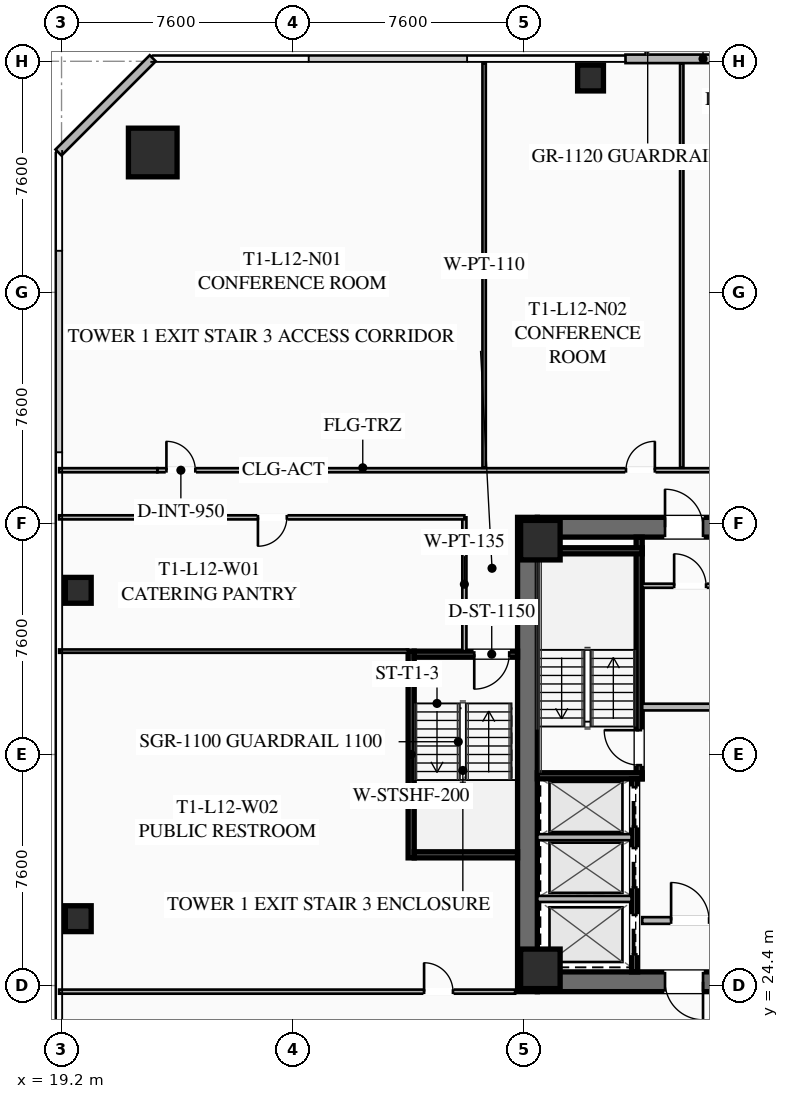
"""IFC4 building model, lengths in metres.
Left out: names, types, materials, properties, quantities, classifications, styles, units other than length and angle.
Written with IfcOpenShell. Run it as: python <this file> out.ifc"""

import sys

from ifc_helpers import new_model, si_unit, direction, frame, frame_2d, origin, origin_2d, place, context, subcontext, project, spatial, rectangle, hollow_rectangle, extrude, element, fill, save


model = new_model("IFC4")
c1 = context("Model", 3, precision=1e-05, world=origin(), true_north=direction((0.0, 1.0)))
c2 = subcontext(c1, "Body", "Model", "MODEL_VIEW")
j1 = project(units=[si_unit("LENGTHUNIT", "METRE"), si_unit("PLANEANGLEUNIT", "RADIAN")], contexts=[c1])
p1 = place(None, origin())
s1 = spatial("IfcSite", under=j1, at=p1, CompositionType="ELEMENT")
p2 = place(p1, origin())
s2 = spatial("IfcBuilding", under=s1, at=p2, CompositionType="ELEMENT")
p3 = place(p2, frame((0.0, 0.0, 49.45)))
s3 = spatial("IfcBuildingStorey", under=s2, at=p3, CompositionType="ELEMENT", Elevation=49.45)
p4 = place(p3, frame((34.525, 24.2, 0.0), z_axis=(0.0, 0.0, 1.0), x_axis=(0.0, 1.0, 0.0)))
e1 = element("IfcWall", 1, at=p4, inside=s3, PredefinedType="SHEAR", context=c2, shape_type="SweptSolid", body=[
    extrude(rectangle(XDim=15.6, YDim=0.65, at=frame_2d((7.8, 0.0))), origin(), (0.0, 0.0, 1.0), 3.55),
])
p5 = place(p3, frame((49.15, 24.525, 0.0), z_axis=(0.0, 0.0, 1.0), x_axis=(-1.0, 0.0, 0.0)))
e2 = element("IfcWall", 2, at=p5, inside=s3, PredefinedType="SHEAR", context=c2, shape_type="SweptSolid", body=[
    extrude(rectangle(XDim=14.3, YDim=0.65, at=frame_2d((7.15, 0.0))), origin(), (0.0, 0.0, 1.0), 3.55),
])
p6 = place(p5, frame((8.85, 0.0, 0.0)))
e3 = element("IfcOpeningElement", 3, at=p6, cuts=e2, PredefinedType="OPENING", context=c2, shape_type="SweptSolid", body=[
    extrude(rectangle(XDim=1.25, YDim=2.25, at=frame_2d((0.625, 1.125))), frame((0.0, 0.335, 0.0), z_axis=(0.0, -1.0, 0.0), x_axis=(1.0, 0.0, 0.0)), (0.0, 0.0, 1.0), 0.67),
])
p7 = place(p5, frame((3.8, 0.0, 0.0)))
e4 = element("IfcOpeningElement", 4, at=p7, cuts=e2, PredefinedType="OPENING", context=c2, shape_type="SweptSolid", body=[
    extrude(rectangle(XDim=1.25, YDim=2.25, at=frame_2d((0.625, 1.125))), frame((0.0, 0.335, 0.0), z_axis=(0.0, -1.0, 0.0), x_axis=(1.0, 0.0, 0.0)), (0.0, 0.0, 1.0), 0.67),
])
p8 = place(p3, frame((34.85, 39.475, 0.0), z_axis=(0.0, 0.0, 1.0), x_axis=(1.0, 0.0, 0.0)))
e5 = element("IfcWall", 5, at=p8, inside=s3, PredefinedType="SHEAR", context=c2, shape_type="SweptSolid", body=[
    extrude(rectangle(XDim=14.3, YDim=0.65, at=frame_2d((7.15, 0.0))), origin(), (0.0, 0.0, 1.0), 3.55),
])
p9 = place(p8, frame((4.2, 0.0, 0.0)))
e6 = element("IfcOpeningElement", 6, at=p9, cuts=e5, PredefinedType="OPENING", context=c2, shape_type="SweptSolid", body=[
    extrude(rectangle(XDim=1.25, YDim=2.25, at=frame_2d((0.625, 1.125))), frame((0.0, 0.335, 0.0), z_axis=(0.0, -1.0, 0.0), x_axis=(1.0, 0.0, 0.0)), (0.0, 0.0, 1.0), 0.67),
])
p10 = place(p8, frame((9.25, 0.0, 0.0)))
e7 = element("IfcOpeningElement", 7, at=p10, cuts=e5, PredefinedType="OPENING", context=c2, shape_type="SweptSolid", body=[
    extrude(rectangle(XDim=1.25, YDim=2.25, at=frame_2d((0.625, 1.125))), frame((0.0, 0.335, 0.0), z_axis=(0.0, -1.0, 0.0), x_axis=(1.0, 0.0, 0.0)), (0.0, 0.0, 1.0), 0.67),
])
for number, where, z_axis, x_axis in (
    (8, (34.95, 24.95, 0.0), (0.0, 0.0, 1.0), (1.0, 0.0, 0.0)),
    (9, (34.95, 39.05, 0.0), (0.0, 0.0, 1.0), (1.0, 0.0, 0.0)),
):
    element("IfcColumn", number, at=place(p3, frame(where, z_axis=z_axis, x_axis=x_axis)), inside=s3, PredefinedType="COLUMN", context=c2, shape_type="SweptSolid", body=[
        extrude(hollow_rectangle(XDim=1.3, YDim=1.3, WallThickness=0.05, at=origin_2d()), origin(), (0.0, 0.0, 1.0), 3.35),
    ])
p11 = place(p3, frame((22.2, 51.8, 0.0), z_axis=(0.0, 0.0, 1.0), x_axis=(1.0, 0.0, 0.0)))
e10 = element("IfcColumn", 10, at=p11, inside=s3, PredefinedType="COLUMN", context=c2, shape_type="SweptSolid", body=[
    extrude(hollow_rectangle(XDim=1.6, YDim=1.6, WallThickness=0.06, at=origin_2d()), origin(), (0.0, 0.0, 1.0), 3.35),
])
for number, where, z_axis, x_axis in (
    (11, (36.6, 54.25, 0.0), (0.0, 0.0, 1.0), (1.0, 0.0, 0.0)),
    (12, (19.75, 37.4, 0.0), (0.0, 0.0, 1.0), (1.0, 0.0, 0.0)),
    (13, (19.75, 26.6, 0.0), (0.0, 0.0, 1.0), (1.0, 0.0, 0.0)),
):
    element("IfcColumn", number, at=place(p3, frame(where, z_axis=z_axis, x_axis=x_axis)), inside=s3, PredefinedType="COLUMN", context=c2, shape_type="SweptSolid", body=[
        extrude(hollow_rectangle(XDim=0.85, YDim=0.85, WallThickness=0.035, at=origin_2d()), origin(), (0.0, 0.0, 1.0), 3.35),
    ])
p12 = place(p3, frame((37.75, 54.88, 0.0), z_axis=(0.0, 0.0, 1.0), x_axis=(1.0, 0.0, 0.0)))
e14 = element("IfcWall", 14, at=p12, inside=s3, PredefinedType="SOLIDWALL", context=c2, shape_type="SweptSolid", body=[
    extrude(rectangle(XDim=8.5, YDim=0.28, at=frame_2d((4.25, 0.0))), origin(), (0.0, 0.0, 1.0), 3.35),
])
p13 = place(p12, frame((3.6, 0.0, 0.0)))
e15 = element("IfcOpeningElement", 15, at=p13, cuts=e14, PredefinedType="OPENING", context=c2, shape_type="SweptSolid", body=[
    extrude(rectangle(XDim=1.3, YDim=2.15, at=frame_2d((0.65, 1.075))), frame((0.0, 0.15, 0.0), z_axis=(0.0, -1.0, 0.0), x_axis=(1.0, 0.0, 0.0)), (0.0, 0.0, 1.0), 0.3),
])
p14 = place(p12, frame((5.24, 0.0, 0.85)))
e16 = element("IfcOpeningElement", 16, at=p14, cuts=e14, PredefinedType="OPENING", context=c2, shape_type="SweptSolid", body=[
    extrude(rectangle(XDim=1.8, YDim=1.92, at=frame_2d((0.9, 0.96))), frame((0.0, 0.15, 0.0), z_axis=(0.0, -1.0, 0.0), x_axis=(1.0, 0.0, 0.0)), (0.0, 0.0, 1.0), 0.3),
])
p15 = place(p3, frame((19.1, 51.8, 0.0), z_axis=(0.0, 0.0, 1.0), x_axis=(0.707106781187, 0.707106781187, 0.0)))
e17 = element("IfcWall", 17, at=p15, inside=s3, PredefinedType="SOLIDWALL", context=c2, shape_type="SweptSolid", body=[
    extrude(rectangle(XDim=4.384, YDim=0.28, at=frame_2d((2.192, 0.0))), origin(), (0.0, 0.0, 1.0), 3.35),
])
p16 = place(p3, frame((38.2, 31.2, 0.0), z_axis=(0.0, 0.0, 1.0), x_axis=(0.0, 1.0, 0.0)))
e18 = element("IfcWall", 18, at=p16, inside=s3, PredefinedType="SHEAR", context=c2, shape_type="SweptSolid", body=[
    extrude(rectangle(XDim=7.95, YDim=0.2, at=frame_2d((3.975, 0.0))), origin(), (0.0, 0.0, 1.0), 3.35),
])
p17 = place(p16, frame((0.45, 0.0, 0.0)))
e19 = element("IfcOpeningElement", 19, at=p17, cuts=e18, PredefinedType="OPENING", context=c2, shape_type="SweptSolid", body=[
    extrude(rectangle(XDim=1.15, YDim=2.2, at=frame_2d((0.575, 1.1))), frame((0.0, 0.11, 0.0), z_axis=(0.0, -1.0, 0.0), x_axis=(1.0, 0.0, 0.0)), (0.0, 0.0, 1.0), 0.22),
])
for number, where, z_axis, x_axis in (
    (20, (34.85, 31.3, 0.0), (0.0, 0.0, 1.0), (1.0, 0.0, 0.0)),
    (21, (34.85, 38.7, 0.0), (0.0, 0.0, 1.0), (1.0, 0.0, 0.0)),
):
    element("IfcWall", number, at=place(p3, frame(where, z_axis=z_axis, x_axis=x_axis)), inside=s3, PredefinedType="SHEAR", context=c2, shape_type="SweptSolid", body=[
        extrude(rectangle(XDim=3.45, YDim=0.2, at=frame_2d((1.725, 0.0))), origin(), (0.0, 0.0, 1.0), 3.35),
    ])
p18 = place(p3, frame((38.3, 33.56, 0.0), z_axis=(0.0, 0.0, 1.0), x_axis=(1.0, 0.0, 0.0)))
e22 = element("IfcWall", 22, at=p18, inside=s3, PredefinedType="SOLIDWALL", context=c2, shape_type="SweptSolid", body=[
    extrude(rectangle(XDim=3.15, YDim=0.22, at=frame_2d((1.575, 0.0))), origin(), (0.0, 0.0, 1.0), 2.703),
])
p19 = place(p3, frame((38.3, 26.54, 0.0), z_axis=(0.0, 0.0, 1.0), x_axis=(1.0, 0.0, 0.0)))
e23 = element("IfcWall", 23, at=p19, inside=s3, PredefinedType="SOLIDWALL", context=c2, shape_type="SweptSolid", body=[
    extrude(rectangle(XDim=3.15, YDim=0.22, at=frame_2d((1.575, 0.0))), origin(), (0.0, 0.0, 1.0), 2.703),
])
p20 = place(p19, frame((0.95, 0.0, 0.0)))
e24 = element("IfcOpeningElement", 24, at=p20, cuts=e23, PredefinedType="OPENING", context=c2, shape_type="SweptSolid", body=[
    extrude(rectangle(XDim=1.25, YDim=2.25, at=frame_2d((0.625, 1.125))), frame((0.0, 0.12, 0.0), z_axis=(0.0, -1.0, 0.0), x_axis=(1.0, 0.0, 0.0)), (0.0, 0.0, 1.0), 0.24),
])
p21 = place(p3, frame((38.05, 24.85, 0.0), z_axis=(0.0, 0.0, 1.0), x_axis=(0.0, 1.0, 0.0)))
e25 = element("IfcWall", 25, at=p21, inside=s3, PredefinedType="SHEAR", context=c2, shape_type="SweptSolid", body=[
    extrude(rectangle(XDim=6.35, YDim=0.2, at=frame_2d((3.175, 0.0))), origin(), (0.0, 0.0, 1.0), 3.35),
])
p22 = place(p21, frame((4.775, 0.0, 0.0)))
e26 = element("IfcOpeningElement", 26, at=p22, cuts=e25, PredefinedType="OPENING", context=c2, shape_type="SweptSolid", body=[
    extrude(rectangle(XDim=1.3, YDim=2.25, at=frame_2d((0.65, 1.125))), frame((0.0, 0.11, 0.0), z_axis=(0.0, -1.0, 0.0), x_axis=(1.0, 0.0, 0.0)), (0.0, 0.0, 1.0), 0.22),
])
p23 = place(p21, frame((2.775, 0.0, 0.0)))
e27 = element("IfcOpeningElement", 27, at=p23, cuts=e25, PredefinedType="OPENING", context=c2, shape_type="SweptSolid", body=[
    extrude(rectangle(XDim=1.3, YDim=2.25, at=frame_2d((0.65, 1.125))), frame((0.0, 0.11, 0.0), z_axis=(0.0, -1.0, 0.0), x_axis=(1.0, 0.0, 0.0)), (0.0, 0.0, 1.0), 0.22),
])
p24 = place(p21, frame((0.575, 0.0, 0.0)))
e28 = element("IfcOpeningElement", 28, at=p24, cuts=e25, PredefinedType="OPENING", context=c2, shape_type="SweptSolid", body=[
    extrude(rectangle(XDim=1.3, YDim=2.25, at=frame_2d((0.65, 1.125))), frame((0.0, 0.11, 0.0), z_axis=(0.0, -1.0, 0.0), x_axis=(1.0, 0.0, 0.0)), (0.0, 0.0, 1.0), 0.22),
])
for number, where, z_axis, x_axis in (
    (29, (34.85, 27.25, 0.0), (0.0, 0.0, 1.0), (1.0, 0.0, 0.0)),
    (30, (34.85, 29.28, 0.0), (0.0, 0.0, 1.0), (1.0, 0.0, 0.0)),
):
    element("IfcWall", number, at=place(p3, frame(where, z_axis=z_axis, x_axis=x_axis)), inside=s3, PredefinedType="SOLIDWALL", context=c2, shape_type="SweptSolid", body=[
        extrude(rectangle(XDim=3.1, YDim=0.2, at=frame_2d((1.55, 0.0))), origin(), (0.0, 0.0, 1.0), 3.35),
    ])
p25 = place(p3, frame((38.3, 37.55, 0.0), z_axis=(0.0, 0.0, 1.0), x_axis=(1.0, 0.0, 0.0)))
e31 = element("IfcWall", 31, at=p25, inside=s3, PredefinedType="PARTITIONING", context=c2, shape_type="SweptSolid", body=[
    extrude(rectangle(XDim=3.15, YDim=0.135, at=frame_2d((1.575, 0.0))), origin(), (0.0, 0.0, 1.0), 2.703),
])
p26 = place(p25, frame((1.05, 0.0, 0.0)))
e32 = element("IfcOpeningElement", 32, at=p26, cuts=e31, PredefinedType="OPENING", context=c2, shape_type="SweptSolid", body=[
    extrude(rectangle(XDim=1.05, YDim=2.2, at=frame_2d((0.525, 1.1))), frame((0.0, 0.077, 0.0), z_axis=(0.0, -1.0, 0.0), x_axis=(1.0, 0.0, 0.0)), (0.0, 0.0, 1.0), 0.155),
])
p27 = place(p3, frame((30.7, 28.6, 0.0), z_axis=(0.0, 0.0, 1.0), x_axis=(0.0, 1.0, 0.0)))
e33 = element("IfcWall", 33, at=p27, inside=s3, PredefinedType="SHEAR", context=c2, shape_type="SweptSolid", body=[
    extrude(rectangle(XDim=6.8, YDim=0.2, at=frame_2d((3.4, 0.0))), origin(), (0.0, 0.0, 1.0), 3.35),
])
p28 = place(p3, frame((34.2, 35.3, 0.0), z_axis=(0.0, 0.0, 1.0), x_axis=(-1.0, 0.0, 0.0)))
e34 = element("IfcWall", 34, at=p28, inside=s3, PredefinedType="SHEAR", context=c2, shape_type="SweptSolid", body=[
    extrude(rectangle(XDim=3.4, YDim=0.2, at=frame_2d((1.7, 0.0))), origin(), (0.0, 0.0, 1.0), 3.35),
])
p29 = place(p28, frame((0.275, 0.0, 0.0)))
e35 = element("IfcOpeningElement", 35, at=p29, cuts=e34, PredefinedType="OPENING", context=c2, shape_type="SweptSolid", body=[
    extrude(rectangle(XDim=1.15, YDim=2.2, at=frame_2d((0.575, 1.1))), frame((0.0, 0.11, 0.0), z_axis=(0.0, -1.0, 0.0), x_axis=(1.0, 0.0, 0.0)), (0.0, 0.0, 1.0), 0.22),
])
p30 = place(p3, frame((30.8, 28.7, 0.0), z_axis=(0.0, 0.0, 1.0), x_axis=(1.0, 0.0, 0.0)))
e36 = element("IfcWall", 36, at=p30, inside=s3, PredefinedType="SHEAR", context=c2, shape_type="SweptSolid", body=[
    extrude(rectangle(XDim=3.4, YDim=0.2, at=frame_2d((1.7, 0.0))), origin(), (0.0, 0.0, 1.0), 3.35),
])
p31 = place(p3, frame((32.45, 35.4, 0.0), z_axis=(0.0, 0.0, 1.0), x_axis=(0.0, 1.0, 0.0)))
e37 = element("IfcWall", 37, at=p31, inside=s3, PredefinedType="PARTITIONING", context=c2, shape_type="SweptSolid", body=[
    extrude(rectangle(XDim=4.4, YDim=0.135, at=frame_2d((2.2, 0.0))), origin(), (0.0, 0.0, 1.0), 2.703),
])
p32 = place(p3, frame((22.35, 41.35, 0.0), z_axis=(0.0, 0.0, 1.0), x_axis=(1.0, 0.0, 0.0)))
e38 = element("IfcWall", 38, at=p32, inside=s3, PredefinedType="PARTITIONING", context=c2, shape_type="SweptSolid", body=[
    extrude(rectangle(XDim=29.0, YDim=0.135, at=frame_2d((14.5, 0.0))), origin(), (0.0, 0.0, 1.0), 2.703),
])
p33 = place(p32, frame((0.3, 0.0, 0.0)))
e39 = element("IfcOpeningElement", 39, at=p33, cuts=e38, PredefinedType="OPENING", context=c2, shape_type="SweptSolid", body=[
    extrude(rectangle(XDim=0.95, YDim=2.05, at=frame_2d((0.475, 1.025))), frame((0.0, 0.077, 0.0), z_axis=(0.0, -1.0, 0.0), x_axis=(1.0, 0.0, 0.0)), (0.0, 0.0, 1.0), 0.155),
])
p34 = place(p32, frame((15.416, 0.0, 0.0)))
e40 = element("IfcOpeningElement", 40, at=p34, cuts=e38, PredefinedType="OPENING", context=c2, shape_type="SweptSolid", body=[
    extrude(rectangle(XDim=0.95, YDim=2.05, at=frame_2d((0.475, 1.025))), frame((0.0, 0.077, 0.0), z_axis=(0.0, -1.0, 0.0), x_axis=(1.0, 0.0, 0.0)), (0.0, 0.0, 1.0), 0.155),
])
p35 = place(p32, frame((19.447, 0.0, 0.0)))
e41 = element("IfcOpeningElement", 41, at=p35, cuts=e38, PredefinedType="OPENING", context=c2, shape_type="SweptSolid", body=[
    extrude(rectangle(XDim=0.95, YDim=2.05, at=frame_2d((0.475, 1.025))), frame((0.0, 0.077, 0.0), z_axis=(0.0, -1.0, 0.0), x_axis=(1.0, 0.0, 0.0)), (0.0, 0.0, 1.0), 0.155),
])
p36 = place(p32, frame((27.75, 0.0, 0.0)))
e42 = element("IfcOpeningElement", 42, at=p36, cuts=e38, PredefinedType="OPENING", context=c2, shape_type="SweptSolid", body=[
    extrude(rectangle(XDim=0.95, YDim=2.05, at=frame_2d((0.475, 1.025))), frame((0.0, 0.077, 0.0), z_axis=(0.0, -1.0, 0.0), x_axis=(1.0, 0.0, 0.0)), (0.0, 0.0, 1.0), 0.155),
])
p37 = place(p3, frame((19.12, 41.35, 0.0), z_axis=(0.0, 0.0, 1.0), x_axis=(1.0, 0.0, 0.0)))
e43 = element("IfcWall", 43, at=p37, inside=s3, PredefinedType="PARTITIONING", context=c2, shape_type="SweptSolid", body=[
    extrude(rectangle(XDim=3.23, YDim=0.135, at=frame_2d((1.615, 0.0))), origin(), (0.0, 0.0, 1.0), 2.703),
])
for number, where, z_axis, x_axis in (
    (44, (33.1, 41.43, 0.0), (0.0, 0.0, 1.0), (0.0, 1.0, 0.0)),
    (45, (39.6, 41.43, 0.0), (0.0, 0.0, 1.0), (0.0, 1.0, 0.0)),
):
    element("IfcWall", number, at=place(p3, frame(where, z_axis=z_axis, x_axis=x_axis)), inside=s3, PredefinedType="PARTITIONING", context=c2, shape_type="SweptSolid", body=[
        extrude(rectangle(XDim=13.3, YDim=0.11, at=frame_2d((6.65, 0.0))), origin(), (0.0, 0.0, 1.0), 2.703),
    ])
p38 = place(p3, frame((32.45, 39.8, 0.0), z_axis=(0.0, 0.0, 1.0), x_axis=(-1.0, 0.0, 0.0)))
e46 = element("IfcWall", 46, at=p38, inside=s3, PredefinedType="PARTITIONING", context=c2, shape_type="SweptSolid", body=[
    extrude(rectangle(XDim=13.33, YDim=0.135, at=frame_2d((6.665, 0.0))), origin(), (0.0, 0.0, 1.0), 2.703),
])
p39 = place(p38, frame((5.84, 0.0, 0.0)))
e47 = element("IfcOpeningElement", 47, at=p39, cuts=e46, PredefinedType="OPENING", context=c2, shape_type="SweptSolid", body=[
    extrude(rectangle(XDim=0.95, YDim=2.05, at=frame_2d((0.475, 1.025))), frame((0.0, 0.077, 0.0), z_axis=(0.0, -1.0, 0.0), x_axis=(1.0, 0.0, 0.0)), (0.0, 0.0, 1.0), 0.155),
])
p40 = place(p3, frame((19.12, 24.2, 0.0), z_axis=(0.0, 0.0, 1.0), x_axis=(1.0, 0.0, 0.0)))
e48 = element("IfcWall", 48, at=p40, inside=s3, PredefinedType="PARTITIONING", context=c2, shape_type="SweptSolid", body=[
    extrude(rectangle(XDim=15.0, YDim=0.135, at=frame_2d((7.5, 0.0))), origin(), (0.0, 0.0, 1.0), 2.703),
])
p41 = place(p40, frame((12.005, 0.0, 0.0)))
e49 = element("IfcOpeningElement", 49, at=p41, cuts=e48, PredefinedType="OPENING", context=c2, shape_type="SweptSolid", body=[
    extrude(rectangle(XDim=0.95, YDim=2.05, at=frame_2d((0.475, 1.025))), frame((0.0, 0.077, 0.0), z_axis=(0.0, -1.0, 0.0), x_axis=(1.0, 0.0, 0.0)), (0.0, 0.0, 1.0), 0.155),
])
p42 = place(p3, frame((30.6, 35.4, 0.0), z_axis=(0.0, 0.0, 1.0), x_axis=(-1.0, 0.0, 0.0)))
e50 = element("IfcWall", 50, at=p42, inside=s3, PredefinedType="PARTITIONING", context=c2, shape_type="SweptSolid", body=[
    extrude(rectangle(XDim=11.48, YDim=0.11, at=frame_2d((5.74, 0.0))), origin(), (0.0, 0.0, 1.0), 2.703),
])
p43 = place(p9, origin())
e51 = element("IfcDoor", 51, at=p43, inside=s3, OperationType="SINGLE_SWING_LEFT", PredefinedType="DOOR", context=c2, shape_type="SweptSolid", body=[
    extrude(rectangle(XDim=1.25, YDim=2.25, at=frame_2d((0.625, 1.125))), frame((0.0, 0.025, 0.0), z_axis=(0.0, -1.0, 0.0), x_axis=(1.0, 0.0, 0.0)), (0.0, 0.0, 1.0), 0.05),
])
fill(e6, e51)
p44 = place(p6, origin())
e52 = element("IfcDoor", 52, at=p44, inside=s3, OperationType="SINGLE_SWING_LEFT", PredefinedType="DOOR", context=c2, shape_type="SweptSolid", body=[
    extrude(rectangle(XDim=1.25, YDim=2.25, at=frame_2d((0.625, 1.125))), frame((0.0, 0.025, 0.0), z_axis=(0.0, -1.0, 0.0), x_axis=(1.0, 0.0, 0.0)), (0.0, 0.0, 1.0), 0.05),
])
fill(e3, e52)
p45 = place(p17, origin())
e53 = element("IfcDoor", 53, at=p45, inside=s3, OperationType="SINGLE_SWING_RIGHT", PredefinedType="DOOR", context=c2, shape_type="SweptSolid", body=[
    extrude(rectangle(XDim=1.15, YDim=2.2, at=frame_2d((0.575, 1.1))), frame((0.0, 0.025, 0.0), z_axis=(0.0, -1.0, 0.0), x_axis=(1.0, 0.0, 0.0)), (0.0, 0.0, 1.0), 0.05),
])
fill(e19, e53)
p46 = place(p20, origin())
e54 = element("IfcDoor", 54, at=p46, inside=s3, OperationType="SINGLE_SWING_LEFT", PredefinedType="DOOR", context=c2, shape_type="SweptSolid", body=[
    extrude(rectangle(XDim=1.25, YDim=2.25, at=frame_2d((0.625, 1.125))), frame((0.0, 0.025, 0.0), z_axis=(0.0, -1.0, 0.0), x_axis=(1.0, 0.0, 0.0)), (0.0, 0.0, 1.0), 0.05),
])
fill(e24, e54)
p47 = place(p26, origin())
e55 = element("IfcDoor", 55, at=p47, inside=s3, OperationType="SINGLE_SWING_LEFT", PredefinedType="DOOR", context=c2, shape_type="SweptSolid", body=[
    extrude(rectangle(XDim=1.05, YDim=2.2, at=frame_2d((0.525, 1.1))), frame((0.0, 0.025, 0.0), z_axis=(0.0, -1.0, 0.0), x_axis=(1.0, 0.0, 0.0)), (0.0, 0.0, 1.0), 0.05),
])
fill(e32, e55)
p48 = place(p29, origin())
e56 = element("IfcDoor", 56, at=p48, inside=s3, OperationType="SINGLE_SWING_RIGHT", PredefinedType="DOOR", context=c2, shape_type="SweptSolid", body=[
    extrude(rectangle(XDim=1.15, YDim=2.2, at=frame_2d((0.575, 1.1))), frame((0.0, 0.025, 0.0), z_axis=(0.0, -1.0, 0.0), x_axis=(1.0, 0.0, 0.0)), (0.0, 0.0, 1.0), 0.05),
])
fill(e35, e56)
p49 = place(p33, origin())
e57 = element("IfcDoor", 57, at=p49, inside=s3, OperationType="SINGLE_SWING_LEFT", PredefinedType="DOOR", context=c2, shape_type="SweptSolid", body=[
    extrude(rectangle(XDim=0.95, YDim=2.05, at=frame_2d((0.475, 1.025))), frame((0.0, 0.025, 0.0), z_axis=(0.0, -1.0, 0.0), x_axis=(1.0, 0.0, 0.0)), (0.0, 0.0, 1.0), 0.05),
])
fill(e39, e57)
p50 = place(p34, origin())
e58 = element("IfcDoor", 58, at=p50, inside=s3, OperationType="SINGLE_SWING_RIGHT", PredefinedType="DOOR", context=c2, shape_type="SweptSolid", body=[
    extrude(rectangle(XDim=0.95, YDim=2.05, at=frame_2d((0.475, 1.025))), frame((0.0, 0.025, 0.0), z_axis=(0.0, -1.0, 0.0), x_axis=(1.0, 0.0, 0.0)), (0.0, 0.0, 1.0), 0.05),
])
fill(e40, e58)
p51 = place(p39, origin())
e59 = element("IfcDoor", 59, at=p51, inside=s3, OperationType="SINGLE_SWING_RIGHT", PredefinedType="DOOR", context=c2, shape_type="SweptSolid", body=[
    extrude(rectangle(XDim=0.95, YDim=2.05, at=frame_2d((0.475, 1.025))), frame((0.0, 0.025, 0.0), z_axis=(0.0, -1.0, 0.0), x_axis=(1.0, 0.0, 0.0)), (0.0, 0.0, 1.0), 0.05),
])
fill(e47, e59)
p52 = place(p41, origin())
e60 = element("IfcDoor", 60, at=p52, inside=s3, OperationType="SINGLE_SWING_LEFT", PredefinedType="DOOR", context=c2, shape_type="SweptSolid", body=[
    extrude(rectangle(XDim=0.95, YDim=2.05, at=frame_2d((0.475, 1.025))), frame((0.0, 0.025, 0.0), z_axis=(0.0, -1.0, 0.0), x_axis=(1.0, 0.0, 0.0)), (0.0, 0.0, 1.0), 0.05),
])
fill(e49, e60)
p53 = place(p22, origin())
e61 = element("IfcDoor", 61, at=p53, inside=s3, OperationType="SLIDING_TO_LEFT", PredefinedType="DOOR", context=c2, shape_type="SweptSolid", body=[
    extrude(rectangle(XDim=1.3, YDim=2.25, at=frame_2d((0.65, 1.125))), frame((0.0, 0.025, 0.0), z_axis=(0.0, -1.0, 0.0), x_axis=(1.0, 0.0, 0.0)), (0.0, 0.0, 1.0), 0.05),
])
fill(e26, e61)
p54 = place(p23, origin())
e62 = element("IfcDoor", 62, at=p54, inside=s3, OperationType="SLIDING_TO_LEFT", PredefinedType="DOOR", context=c2, shape_type="SweptSolid", body=[
    extrude(rectangle(XDim=1.3, YDim=2.25, at=frame_2d((0.65, 1.125))), frame((0.0, 0.025, 0.0), z_axis=(0.0, -1.0, 0.0), x_axis=(1.0, 0.0, 0.0)), (0.0, 0.0, 1.0), 0.05),
])
fill(e27, e62)
p55 = place(p24, origin())
e63 = element("IfcDoor", 63, at=p55, inside=s3, OperationType="SLIDING_TO_LEFT", PredefinedType="DOOR", context=c2, shape_type="SweptSolid", body=[
    extrude(rectangle(XDim=1.3, YDim=2.25, at=frame_2d((0.65, 1.125))), frame((0.0, 0.025, 0.0), z_axis=(0.0, -1.0, 0.0), x_axis=(1.0, 0.0, 0.0)), (0.0, 0.0, 1.0), 0.05),
])
fill(e28, e63)
save(model, sys.argv[1])
